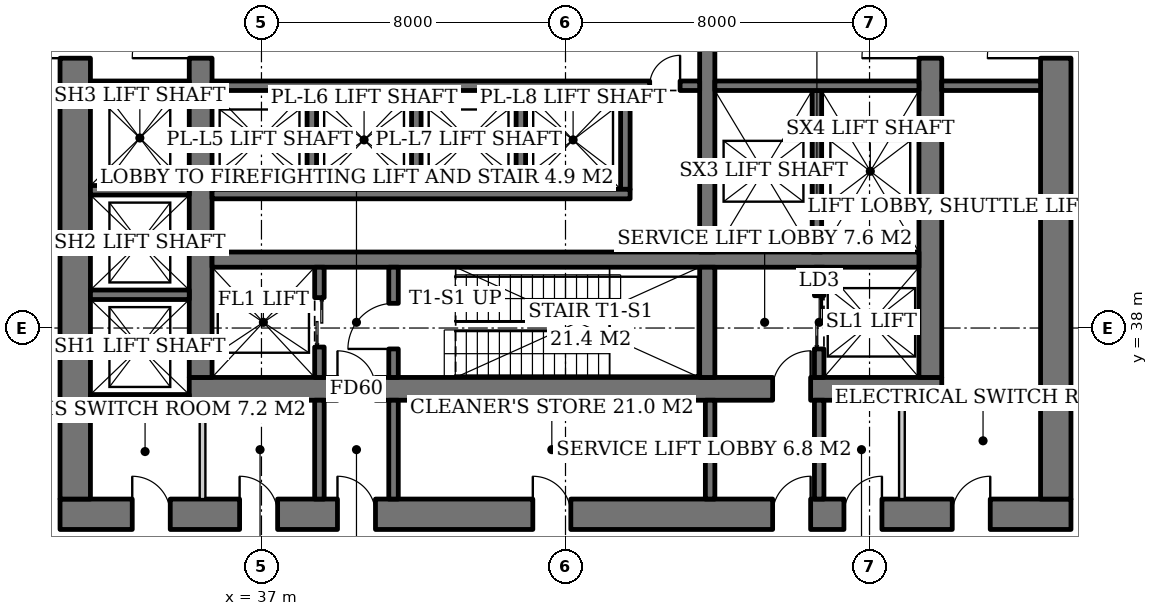
"""IFC4 building model, lengths in metres.
Left out: names, types, materials, properties, quantities, classifications, styles, units other than length and angle.
Written with IfcOpenShell. Run it as: python <this file> out.ifc"""

import sys

from ifc_helpers import new_model, si_unit, direction, frame, frame_2d, origin, place, context, subcontext, project, spatial, rectangle, extrude, element, fill, save


model = new_model("IFC4")
c1 = context("Model", 3, precision=1e-05, world=origin(), true_north=direction((0.0, 1.0)))
c2 = subcontext(c1, "Body", "Model", "MODEL_VIEW")
j1 = project(units=[si_unit("LENGTHUNIT", "METRE"), si_unit("PLANEANGLEUNIT", "RADIAN")], contexts=[c1])
p1 = place(None, origin())
s1 = spatial("IfcSite", under=j1, at=p1, CompositionType="ELEMENT")
p2 = place(p1, origin())
s2 = spatial("IfcBuilding", under=s1, at=p2, CompositionType="ELEMENT")
p3 = place(p2, frame((0.0, 0.0, 11.0)))
s3 = spatial("IfcBuildingStorey", under=s2, at=p3, CompositionType="ELEMENT", Elevation=11.0)
p4 = place(p3, frame((35.1, 36.4, 0.0), z_axis=(0.0, 0.0, 1.0), x_axis=(1.0, 0.0, 0.0)))
e1 = element("IfcWall", 1, at=p4, inside=s3, PredefinedType="SHEAR", context=c2, shape_type="SweptSolid", body=[
    extrude(rectangle(XDim=19.8, YDim=0.6, at=frame_2d((9.9, 0.0))), origin(), (0.0, 0.0, 1.0), 5.0),
])
p5 = place(p4, frame((3.9, 0.0, 0.0)))
e2 = element("IfcOpeningElement", 2, at=p5, cuts=e1, PredefinedType="OPENING", context=c2, shape_type="SweptSolid", body=[
    extrude(rectangle(XDim=1.0, YDim=2.1, at=frame_2d((0.5, 1.05))), frame((0.0, 0.31, 0.0), z_axis=(0.0, -1.0, 0.0), x_axis=(1.0, 0.0, 0.0)), (0.0, 0.0, 1.0), 0.62),
])
p6 = place(p4, frame((15.35, 0.0, 0.0)))
e3 = element("IfcOpeningElement", 3, at=p6, cuts=e1, PredefinedType="OPENING", context=c2, shape_type="SweptSolid", body=[
    extrude(rectangle(XDim=1.0, YDim=2.1, at=frame_2d((0.5, 1.05))), frame((0.0, 0.31, 0.0), z_axis=(0.0, -1.0, 0.0), x_axis=(1.0, 0.0, 0.0)), (0.0, 0.0, 1.0), 0.62),
])
p7 = place(p3, frame((35.4, 36.7, 0.0), z_axis=(0.0, 0.0, 1.0), x_axis=(0.0, 1.0, 0.0)))
e4 = element("IfcWall", 4, at=p7, inside=s3, PredefinedType="SHEAR", context=c2, shape_type="SweptSolid", body=[
    extrude(rectangle(XDim=18.6, YDim=0.6, at=frame_2d((9.3, 0.0))), origin(), (0.0, 0.0, 1.0), 5.0),
])
p8 = place(p7, frame((8.4, 0.0, 0.0)))
e5 = element("IfcOpeningElement", 5, at=p8, cuts=e4, PredefinedType="OPENING", context=c2, shape_type="SweptSolid", body=[
    extrude(rectangle(XDim=1.8, YDim=2.4, at=frame_2d((0.9, 1.2))), frame((0.0, 0.31, 0.0), z_axis=(0.0, -1.0, 0.0), x_axis=(1.0, 0.0, 0.0)), (0.0, 0.0, 1.0), 0.62),
])
p9 = place(p3, frame((54.6, 36.7, 0.0), z_axis=(0.0, 0.0, 1.0), x_axis=(0.0, 1.0, 0.0)))
e6 = element("IfcWall", 6, at=p9, inside=s3, PredefinedType="SHEAR", context=c2, shape_type="SweptSolid", body=[
    extrude(rectangle(XDim=18.6, YDim=0.6, at=frame_2d((9.3, 0.0))), origin(), (0.0, 0.0, 1.0), 5.0),
])
p10 = place(p9, frame((8.4, 0.0, 0.0)))
e7 = element("IfcOpeningElement", 7, at=p10, cuts=e6, PredefinedType="OPENING", context=c2, shape_type="SweptSolid", body=[
    extrude(rectangle(XDim=1.8, YDim=2.4, at=frame_2d((0.9, 1.2))), frame((0.0, 0.31, 0.0), z_axis=(0.0, -1.0, 0.0), x_axis=(1.0, 0.0, 0.0)), (0.0, 0.0, 1.0), 0.62),
])
p11 = place(p3, frame((31.7, 33.1, 0.0), z_axis=(0.0, 0.0, 1.0), x_axis=(1.0, 0.0, 0.0)))
e8 = element("IfcWall", 8, at=p11, inside=s3, PredefinedType="SHEAR", context=c2, shape_type="SweptSolid", body=[
    extrude(rectangle(XDim=26.6, YDim=0.8, at=frame_2d((13.3, 0.0))), origin(), (0.0, 0.0, 1.0), 5.0),
])
p12 = place(p11, frame((7.3, 0.0, 0.0)))
e9 = element("IfcOpeningElement", 9, at=p12, cuts=e8, PredefinedType="OPENING", context=c2, shape_type="SweptSolid", body=[
    extrude(rectangle(XDim=1.0, YDim=2.1, at=frame_2d((0.5, 1.05))), frame((0.0, 0.41, 0.0), z_axis=(0.0, -1.0, 0.0), x_axis=(1.0, 0.0, 0.0)), (0.0, 0.0, 1.0), 0.82),
])
p13 = place(p11, frame((18.75, 0.0, 0.0)))
e10 = element("IfcOpeningElement", 10, at=p13, cuts=e8, PredefinedType="OPENING", context=c2, shape_type="SweptSolid", body=[
    extrude(rectangle(XDim=1.0, YDim=2.1, at=frame_2d((0.5, 1.05))), frame((0.0, 0.41, 0.0), z_axis=(0.0, -1.0, 0.0), x_axis=(1.0, 0.0, 0.0)), (0.0, 0.0, 1.0), 0.82),
])
p14 = place(p11, frame((1.9, 0.0, 0.0)))
e11 = element("IfcOpeningElement", 11, at=p14, cuts=e8, PredefinedType="OPENING", context=c2, shape_type="SweptSolid", body=[
    extrude(rectangle(XDim=1.0, YDim=2.1, at=frame_2d((0.5, 1.05))), frame((0.0, 0.41, 0.0), z_axis=(0.0, -1.0, 0.0), x_axis=(1.0, 0.0, 0.0)), (0.0, 0.0, 1.0), 0.82),
])
p15 = place(p11, frame((4.725, 0.0, 0.0)))
e12 = element("IfcOpeningElement", 12, at=p15, cuts=e8, PredefinedType="OPENING", context=c2, shape_type="SweptSolid", body=[
    extrude(rectangle(XDim=1.0, YDim=2.1, at=frame_2d((0.5, 1.05))), frame((0.0, 0.41, 0.0), z_axis=(0.0, -1.0, 0.0), x_axis=(1.0, 0.0, 0.0)), (0.0, 0.0, 1.0), 0.82),
])
p16 = place(p11, frame((12.44, 0.0, 0.0)))
e13 = element("IfcOpeningElement", 13, at=p16, cuts=e8, PredefinedType="OPENING", context=c2, shape_type="SweptSolid", body=[
    extrude(rectangle(XDim=1.0, YDim=2.1, at=frame_2d((0.5, 1.05))), frame((0.0, 0.41, 0.0), z_axis=(0.0, -1.0, 0.0), x_axis=(1.0, 0.0, 0.0)), (0.0, 0.0, 1.0), 0.82),
])
p17 = place(p11, frame((20.626, 0.0, 0.0)))
e14 = element("IfcOpeningElement", 14, at=p17, cuts=e8, PredefinedType="OPENING", context=c2, shape_type="SweptSolid", body=[
    extrude(rectangle(XDim=1.0, YDim=2.1, at=frame_2d((0.5, 1.05))), frame((0.0, 0.41, 0.0), z_axis=(0.0, -1.0, 0.0), x_axis=(1.0, 0.0, 0.0)), (0.0, 0.0, 1.0), 0.82),
])
p18 = place(p11, frame((23.476, 0.0, 0.0)))
e15 = element("IfcOpeningElement", 15, at=p18, cuts=e8, PredefinedType="OPENING", context=c2, shape_type="SweptSolid", body=[
    extrude(rectangle(XDim=1.0, YDim=2.1, at=frame_2d((0.5, 1.05))), frame((0.0, 0.41, 0.0), z_axis=(0.0, -1.0, 0.0), x_axis=(1.0, 0.0, 0.0)), (0.0, 0.0, 1.0), 0.82),
])
p19 = place(p3, frame((32.1, 33.5, 0.0), z_axis=(0.0, 0.0, 1.0), x_axis=(0.0, 1.0, 0.0)))
e16 = element("IfcWall", 16, at=p19, inside=s3, PredefinedType="SHEAR", context=c2, shape_type="SweptSolid", body=[
    extrude(rectangle(XDim=25.0, YDim=0.8, at=frame_2d((12.5, 0.0))), origin(), (0.0, 0.0, 1.0), 5.0),
])
p20 = place(p19, frame((11.6, 0.0, 0.0)))
e17 = element("IfcOpeningElement", 17, at=p20, cuts=e16, PredefinedType="OPENING", context=c2, shape_type="SweptSolid", body=[
    extrude(rectangle(XDim=1.8, YDim=2.4, at=frame_2d((0.9, 1.2))), frame((0.0, 0.41, 0.0), z_axis=(0.0, -1.0, 0.0), x_axis=(1.0, 0.0, 0.0)), (0.0, 0.0, 1.0), 0.82),
])
p21 = place(p3, frame((57.9, 33.5, 0.0), z_axis=(0.0, 0.0, 1.0), x_axis=(0.0, 1.0, 0.0)))
e18 = element("IfcWall", 18, at=p21, inside=s3, PredefinedType="SHEAR", context=c2, shape_type="SweptSolid", body=[
    extrude(rectangle(XDim=25.0, YDim=0.8, at=frame_2d((12.5, 0.0))), origin(), (0.0, 0.0, 1.0), 5.0),
])
p22 = place(p21, frame((11.6, 0.0, 0.0)))
e19 = element("IfcOpeningElement", 19, at=p22, cuts=e18, PredefinedType="OPENING", context=c2, shape_type="SweptSolid", body=[
    extrude(rectangle(XDim=1.8, YDim=2.4, at=frame_2d((0.9, 1.2))), frame((0.0, 0.41, 0.0), z_axis=(0.0, -1.0, 0.0), x_axis=(1.0, 0.0, 0.0)), (0.0, 0.0, 1.0), 0.82),
])
p23 = place(p3, frame((35.7, 39.8, 0.0), z_axis=(0.0, 0.0, 1.0), x_axis=(1.0, 0.0, 0.0)))
e20 = element("IfcWall", 20, at=p23, inside=s3, PredefinedType="SHEAR", context=c2, shape_type="SweptSolid", body=[
    extrude(rectangle(XDim=18.6, YDim=0.4, at=frame_2d((9.3, 0.0))), origin(), (0.0, 0.0, 1.0), 5.0),
])
p24 = place(p3, frame((48.73, 36.7, 0.0), z_axis=(0.0, 0.0, 1.0), x_axis=(0.0, 1.0, 0.0)))
e21 = element("IfcWall", 21, at=p24, inside=s3, PredefinedType="SHEAR", context=c2, shape_type="SweptSolid", body=[
    extrude(rectangle(XDim=2.9, YDim=0.4, at=frame_2d((1.45, 0.0))), origin(), (0.0, 0.0, 1.0), 5.0),
])
p25 = place(p3, frame((48.73, 40.0, 0.0), z_axis=(0.0, 0.0, 1.0), x_axis=(0.0, 1.0, 0.0)))
e22 = element("IfcWall", 22, at=p25, inside=s3, PredefinedType="SHEAR", context=c2, shape_type="SweptSolid", body=[
    extrude(rectangle(XDim=12.0, YDim=0.4, at=frame_2d((6.0, 0.0))), origin(), (0.0, 0.0, 1.0), 5.0),
])
p26 = place(p3, frame((38.525, 36.7, 0.0), z_axis=(0.0, 0.0, 1.0), x_axis=(0.0, 1.0, 0.0)))
e23 = element("IfcWall", 23, at=p26, inside=s3, PredefinedType="SHEAR", context=c2, shape_type="SweptSolid", body=[
    extrude(rectangle(XDim=2.9, YDim=0.25, at=frame_2d((1.45, 0.0))), origin(), (0.0, 0.0, 1.0), 5.0),
])
p27 = place(p26, frame((0.8, 0.0, 0.0)))
e24 = element("IfcOpeningElement", 24, at=p27, cuts=e23, PredefinedType="OPENING", context=c2, shape_type="SweptSolid", body=[
    extrude(rectangle(XDim=1.3, YDim=2.2, at=frame_2d((0.65, 1.1))), frame((0.0, 0.135, 0.0), z_axis=(0.0, -1.0, 0.0), x_axis=(1.0, 0.0, 0.0)), (0.0, 0.0, 1.0), 0.27),
])
p28 = place(p3, frame((40.475, 36.7, 0.0), z_axis=(0.0, 0.0, 1.0), x_axis=(0.0, 1.0, 0.0)))
e25 = element("IfcWall", 25, at=p28, inside=s3, PredefinedType="SHEAR", context=c2, shape_type="SweptSolid", body=[
    extrude(rectangle(XDim=2.9, YDim=0.25, at=frame_2d((1.45, 0.0))), origin(), (0.0, 0.0, 1.0), 5.0),
])
p29 = place(p28, frame((0.75, 0.0, 0.0)))
e26 = element("IfcOpeningElement", 26, at=p29, cuts=e25, PredefinedType="OPENING", context=c2, shape_type="SweptSolid", body=[
    extrude(rectangle(XDim=1.2, YDim=2.1, at=frame_2d((0.6, 1.05))), frame((0.0, 0.135, 0.0), z_axis=(0.0, -1.0, 0.0), x_axis=(1.0, 0.0, 0.0)), (0.0, 0.0, 1.0), 0.27),
])
p30 = place(p3, frame((51.675, 36.7, 0.0), z_axis=(0.0, 0.0, 1.0), x_axis=(0.0, 1.0, 0.0)))
e27 = element("IfcWall", 27, at=p30, inside=s3, PredefinedType="SHEAR", context=c2, shape_type="SweptSolid", body=[
    extrude(rectangle(XDim=2.9, YDim=0.25, at=frame_2d((1.45, 0.0))), origin(), (0.0, 0.0, 1.0), 5.0),
])
p31 = place(p30, frame((0.75, 0.0, 0.0)))
e28 = element("IfcOpeningElement", 28, at=p31, cuts=e27, PredefinedType="OPENING", context=c2, shape_type="SweptSolid", body=[
    extrude(rectangle(XDim=1.4, YDim=2.4, at=frame_2d((0.7, 1.2))), frame((0.0, 0.135, 0.0), z_axis=(0.0, -1.0, 0.0), x_axis=(1.0, 0.0, 0.0)), (0.0, 0.0, 1.0), 0.27),
])
for number, where, z_axis, x_axis in (
    (29, (38.325, 44.25, 0.0), (0.0, 0.0, 1.0), (0.0, -1.0, 0.0)),
    (30, (41.075, 44.25, 0.0), (0.0, 0.0, 1.0), (0.0, -1.0, 0.0)),
    (31, (43.825, 44.25, 0.0), (0.0, 0.0, 1.0), (0.0, -1.0, 0.0)),
    (32, (46.575, 44.25, 0.0), (0.0, 0.0, 1.0), (0.0, -1.0, 0.0)),
):
    element("IfcWall", number, at=place(p3, frame(where, z_axis=z_axis, x_axis=x_axis)), inside=s3, PredefinedType="SHEAR", context=c2, shape_type="SweptSolid", body=[
        extrude(rectangle(XDim=2.6, YDim=0.25, at=frame_2d((1.3, 0.0))), origin(), (0.0, 0.0, 1.0), 5.0),
    ])
p32 = place(p3, frame((35.7, 41.525, 0.0), z_axis=(0.0, 0.0, 1.0), x_axis=(1.0, 0.0, 0.0)))
e33 = element("IfcWall", 33, at=p32, inside=s3, PredefinedType="SHEAR", context=c2, shape_type="SweptSolid", body=[
    extrude(rectangle(XDim=11.0, YDim=0.25, at=frame_2d((5.5, 0.0))), origin(), (0.0, 0.0, 1.0), 5.0),
])
p33 = place(p3, frame((35.7, 44.375, 0.0), z_axis=(0.0, 0.0, 1.0), x_axis=(1.0, 0.0, 0.0)))
e34 = element("IfcWall", 34, at=p33, inside=s3, PredefinedType="SHEAR", context=c2, shape_type="SweptSolid", body=[
    extrude(rectangle(XDim=12.83, YDim=0.25, at=frame_2d((6.415, 0.0))), origin(), (0.0, 0.0, 1.0), 5.0),
])
p34 = place(p33, frame((11.515, 0.0, 0.0)))
e35 = element("IfcOpeningElement", 35, at=p34, cuts=e34, PredefinedType="OPENING", context=c2, shape_type="SweptSolid", body=[
    extrude(rectangle(XDim=0.8, YDim=2.0, at=frame_2d((0.4, 1.0))), frame((0.0, 0.135, 0.0), z_axis=(0.0, -1.0, 0.0), x_axis=(1.0, 0.0, 0.0)), (0.0, 0.0, 1.0), 0.27),
])
p35 = place(p3, frame((51.615, 44.25, 0.0), z_axis=(0.0, 0.0, 1.0), x_axis=(0.0, -1.0, 0.0)))
e36 = element("IfcWall", 36, at=p35, inside=s3, PredefinedType="SHEAR", context=c2, shape_type="SweptSolid", body=[
    extrude(rectangle(XDim=4.25, YDim=0.25, at=frame_2d((2.125, 0.0))), origin(), (0.0, 0.0, 1.0), 5.0),
])
p36 = place(p3, frame((48.93, 44.375, 0.0), z_axis=(0.0, 0.0, 1.0), x_axis=(1.0, 0.0, 0.0)))
e37 = element("IfcWall", 37, at=p36, inside=s3, PredefinedType="SHEAR", context=c2, shape_type="SweptSolid", body=[
    extrude(rectangle(XDim=5.37, YDim=0.25, at=frame_2d((2.685, 0.0))), origin(), (0.0, 0.0, 1.0), 5.0),
])
for number, where, z_axis, x_axis in (
    (38, (32.5, 36.125, 0.0), (0.0, 0.0, 1.0), (1.0, 0.0, 0.0)),
    (39, (32.5, 38.875, 0.0), (0.0, 0.0, 1.0), (1.0, 0.0, 0.0)),
    (40, (32.5, 41.625, 0.0), (0.0, 0.0, 1.0), (1.0, 0.0, 0.0)),
    (41, (32.5, 44.375, 0.0), (0.0, 0.0, 1.0), (1.0, 0.0, 0.0)),
):
    element("IfcWall", number, at=place(p3, frame(where, z_axis=z_axis, x_axis=x_axis)), inside=s3, PredefinedType="SHEAR", context=c2, shape_type="SweptSolid", body=[
        extrude(rectangle(XDim=2.6, YDim=0.25, at=frame_2d((1.3, 0.0))), origin(), (0.0, 0.0, 1.0), 5.0),
    ])
for number, where, z_axis, x_axis in (
    (42, (38.525, 33.5, 0.0), (0.0, 0.0, 1.0), (0.0, 1.0, 0.0)),
    (43, (40.475, 33.5, 0.0), (0.0, 0.0, 1.0), (0.0, 1.0, 0.0)),
    (44, (54.9, 44.375, 0.0), (0.0, 0.0, 1.0), (1.0, 0.0, 0.0)),
    (45, (48.805, 33.5, 0.0), (0.0, 0.0, 1.0), (0.0, 1.0, 0.0)),
    (46, (51.675, 33.5, 0.0), (0.0, 0.0, 1.0), (0.0, 1.0, 0.0)),
):
    element("IfcWall", number, at=place(p3, frame(where, z_axis=z_axis, x_axis=x_axis)), inside=s3, PredefinedType="SOLIDWALL", context=c2, shape_type="SweptSolid", body=[
        extrude(rectangle(XDim=2.6, YDim=0.25, at=frame_2d((1.3, 0.0))), origin(), (0.0, 0.0, 1.0), 4.7),
    ])
for number, where, z_axis, x_axis in (
    (47, (35.45, 33.5, 0.0), (0.0, 0.0, 1.0), (0.0, 1.0, 0.0)),
    (48, (53.852, 33.5, 0.0), (0.0, 0.0, 1.0), (0.0, 1.0, 0.0)),
):
    element("IfcWall", number, at=place(p3, frame(where, z_axis=z_axis, x_axis=x_axis)), inside=s3, PredefinedType="SOLIDWALL", context=c2, shape_type="SweptSolid", body=[
        extrude(rectangle(XDim=2.6, YDim=0.15, at=frame_2d((1.3, 0.0))), origin(), (0.0, 0.0, 1.0), 4.7),
    ])
p37 = place(p27, origin())
e49 = element("IfcDoor", 49, at=p37, inside=s3, OperationType="DOUBLE_DOOR_SLIDING", PredefinedType="DOOR", context=c2, shape_type="SweptSolid", body=[
    extrude(rectangle(XDim=1.3, YDim=2.2, at=frame_2d((0.65, 1.1))), frame((0.0, 0.025, 0.0), z_axis=(0.0, -1.0, 0.0), x_axis=(1.0, 0.0, 0.0)), (0.0, 0.0, 1.0), 0.05),
])
fill(e24, e49)
p38 = place(p29, origin())
e50 = element("IfcDoor", 50, at=p38, inside=s3, OperationType="SINGLE_SWING_LEFT", PredefinedType="DOOR", context=c2, shape_type="SweptSolid", body=[
    extrude(rectangle(XDim=1.2, YDim=2.1, at=frame_2d((0.6, 1.05))), frame((0.0, 0.025, 0.0), z_axis=(0.0, -1.0, 0.0), x_axis=(1.0, 0.0, 0.0)), (0.0, 0.0, 1.0), 0.05),
])
fill(e26, e50)
p39 = place(p31, origin())
e51 = element("IfcDoor", 51, at=p39, inside=s3, OperationType="DOUBLE_DOOR_SLIDING", PredefinedType="DOOR", context=c2, shape_type="SweptSolid", body=[
    extrude(rectangle(XDim=1.4, YDim=2.4, at=frame_2d((0.7, 1.2))), frame((0.0, 0.025, 0.0), z_axis=(0.0, -1.0, 0.0), x_axis=(1.0, 0.0, 0.0)), (0.0, 0.0, 1.0), 0.05),
])
fill(e28, e51)
p40 = place(p34, origin())
e52 = element("IfcDoor", 52, at=p40, inside=s3, OperationType="SINGLE_SWING_RIGHT", PredefinedType="DOOR", context=c2, shape_type="SweptSolid", body=[
    extrude(rectangle(XDim=0.8, YDim=2.0, at=frame_2d((0.4, 1.0))), frame((0.0, 0.025, 0.0), z_axis=(0.0, -1.0, 0.0), x_axis=(1.0, 0.0, 0.0)), (0.0, 0.0, 1.0), 0.05),
])
fill(e35, e52)
p41 = place(p5, origin())
e53 = element("IfcDoor", 53, at=p41, inside=s3, OperationType="SINGLE_SWING_LEFT", PredefinedType="DOOR", context=c2, shape_type="SweptSolid", body=[
    extrude(rectangle(XDim=1.0, YDim=2.1, at=frame_2d((0.5, 1.05))), frame((0.0, 0.025, 0.0), z_axis=(0.0, -1.0, 0.0), x_axis=(1.0, 0.0, 0.0)), (0.0, 0.0, 1.0), 0.05),
])
fill(e2, e53)
p42 = place(p8, origin())
e54 = element("IfcDoor", 54, at=p42, inside=s3, OperationType="DOUBLE_DOOR_SINGLE_SWING", PredefinedType="DOOR", context=c2, shape_type="SweptSolid", body=[
    extrude(rectangle(XDim=1.8, YDim=2.4, at=frame_2d((0.9, 1.2))), frame((0.0, 0.025, 0.0), z_axis=(0.0, -1.0, 0.0), x_axis=(1.0, 0.0, 0.0)), (0.0, 0.0, 1.0), 0.05),
])
fill(e5, e54)
p43 = place(p10, origin())
e55 = element("IfcDoor", 55, at=p43, inside=s3, OperationType="DOUBLE_DOOR_SINGLE_SWING", PredefinedType="DOOR", context=c2, shape_type="SweptSolid", body=[
    extrude(rectangle(XDim=1.8, YDim=2.4, at=frame_2d((0.9, 1.2))), frame((0.0, 0.025, 0.0), z_axis=(0.0, -1.0, 0.0), x_axis=(1.0, 0.0, 0.0)), (0.0, 0.0, 1.0), 0.05),
])
fill(e7, e55)
p44 = place(p6, origin())
e56 = element("IfcDoor", 56, at=p44, inside=s3, OperationType="SINGLE_SWING_RIGHT", PredefinedType="DOOR", context=c2, shape_type="SweptSolid", body=[
    extrude(rectangle(XDim=1.0, YDim=2.1, at=frame_2d((0.5, 1.05))), frame((0.0, 0.025, 0.0), z_axis=(0.0, -1.0, 0.0), x_axis=(1.0, 0.0, 0.0)), (0.0, 0.0, 1.0), 0.05),
])
fill(e3, e56)
p45 = place(p20, origin())
e57 = element("IfcDoor", 57, at=p45, inside=s3, OperationType="DOUBLE_DOOR_SINGLE_SWING", PredefinedType="DOOR", context=c2, shape_type="SweptSolid", body=[
    extrude(rectangle(XDim=1.8, YDim=2.4, at=frame_2d((0.9, 1.2))), frame((0.0, 0.025, 0.0), z_axis=(0.0, -1.0, 0.0), x_axis=(1.0, 0.0, 0.0)), (0.0, 0.0, 1.0), 0.05),
])
fill(e17, e57)
p46 = place(p22, origin())
e58 = element("IfcDoor", 58, at=p46, inside=s3, OperationType="DOUBLE_DOOR_SINGLE_SWING", PredefinedType="DOOR", context=c2, shape_type="SweptSolid", body=[
    extrude(rectangle(XDim=1.8, YDim=2.4, at=frame_2d((0.9, 1.2))), frame((0.0, 0.025, 0.0), z_axis=(0.0, -1.0, 0.0), x_axis=(1.0, 0.0, 0.0)), (0.0, 0.0, 1.0), 0.05),
])
fill(e19, e58)
p47 = place(p12, origin())
e59 = element("IfcDoor", 59, at=p47, inside=s3, OperationType="SINGLE_SWING_LEFT", PredefinedType="DOOR", context=c2, shape_type="SweptSolid", body=[
    extrude(rectangle(XDim=1.0, YDim=2.1, at=frame_2d((0.5, 1.05))), frame((0.0, 0.025, 0.0), z_axis=(0.0, -1.0, 0.0), x_axis=(1.0, 0.0, 0.0)), (0.0, 0.0, 1.0), 0.05),
])
fill(e9, e59)
p48 = place(p13, origin())
e60 = element("IfcDoor", 60, at=p48, inside=s3, OperationType="SINGLE_SWING_RIGHT", PredefinedType="DOOR", context=c2, shape_type="SweptSolid", body=[
    extrude(rectangle(XDim=1.0, YDim=2.1, at=frame_2d((0.5, 1.05))), frame((0.0, 0.025, 0.0), z_axis=(0.0, -1.0, 0.0), x_axis=(1.0, 0.0, 0.0)), (0.0, 0.0, 1.0), 0.05),
])
fill(e10, e60)
p49 = place(p14, origin())
e61 = element("IfcDoor", 61, at=p49, inside=s3, OperationType="SINGLE_SWING_LEFT", PredefinedType="DOOR", context=c2, shape_type="SweptSolid", body=[
    extrude(rectangle(XDim=1.0, YDim=2.1, at=frame_2d((0.5, 1.05))), frame((0.0, 0.39, 0.0), z_axis=(0.0, -1.0, 0.0), x_axis=(1.0, 0.0, 0.0)), (0.0, 0.0, 1.0), 0.05),
])
fill(e11, e61)
p50 = place(p15, origin())
e62 = element("IfcDoor", 62, at=p50, inside=s3, OperationType="SINGLE_SWING_LEFT", PredefinedType="DOOR", context=c2, shape_type="SweptSolid", body=[
    extrude(rectangle(XDim=1.0, YDim=2.1, at=frame_2d((0.5, 1.05))), frame((0.0, 0.39, 0.0), z_axis=(0.0, -1.0, 0.0), x_axis=(1.0, 0.0, 0.0)), (0.0, 0.0, 1.0), 0.05),
])
fill(e12, e62)
p51 = place(p16, origin())
e63 = element("IfcDoor", 63, at=p51, inside=s3, OperationType="SINGLE_SWING_LEFT", PredefinedType="DOOR", context=c2, shape_type="SweptSolid", body=[
    extrude(rectangle(XDim=1.0, YDim=2.1, at=frame_2d((0.5, 1.05))), frame((0.0, 0.39, 0.0), z_axis=(0.0, -1.0, 0.0), x_axis=(1.0, 0.0, 0.0)), (0.0, 0.0, 1.0), 0.05),
])
fill(e13, e63)
p52 = place(p17, origin())
e64 = element("IfcDoor", 64, at=p52, inside=s3, OperationType="SINGLE_SWING_RIGHT", PredefinedType="DOOR", context=c2, shape_type="SweptSolid", body=[
    extrude(rectangle(XDim=1.0, YDim=2.1, at=frame_2d((0.5, 1.05))), frame((0.0, 0.39, 0.0), z_axis=(0.0, -1.0, 0.0), x_axis=(1.0, 0.0, 0.0)), (0.0, 0.0, 1.0), 0.05),
])
fill(e14, e64)
p53 = place(p18, origin())
e65 = element("IfcDoor", 65, at=p53, inside=s3, OperationType="SINGLE_SWING_RIGHT", PredefinedType="DOOR", context=c2, shape_type="SweptSolid", body=[
    extrude(rectangle(XDim=1.0, YDim=2.1, at=frame_2d((0.5, 1.05))), frame((0.0, 0.39, 0.0), z_axis=(0.0, -1.0, 0.0), x_axis=(1.0, 0.0, 0.0)), (0.0, 0.0, 1.0), 0.05),
])
fill(e15, e65)
save(model, sys.argv[1])
